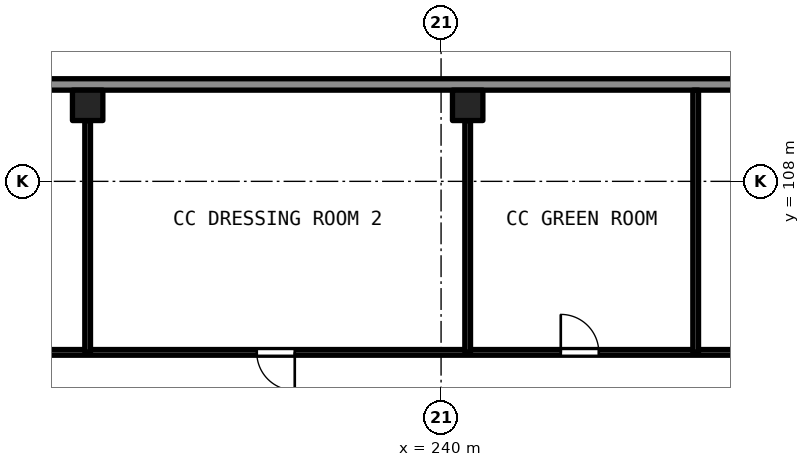
"""IFC4 building model, lengths in metres.
Left out: names, types, materials, properties, quantities, classifications, styles, units other than length and angle.
Written with IfcOpenShell. Run it as: python <this file> out.ifc"""

import sys

from ifc_helpers import new_model, si_unit, direction, frame, frame_2d, origin, origin_2d, place, context, subcontext, project, spatial, rectangle, extrude, element, fill, save


model = new_model("IFC4")
c1 = context("Model", 3, precision=1e-05, world=origin(), true_north=direction((0.0, 1.0)))
c2 = subcontext(c1, "Body", "Model", "MODEL_VIEW")
j1 = project(units=[si_unit("LENGTHUNIT", "METRE"), si_unit("PLANEANGLEUNIT", "RADIAN")], contexts=[c1])
p1 = place(None, origin())
s1 = spatial("IfcSite", under=j1, at=p1, CompositionType="ELEMENT")
p2 = place(p1, origin())
s2 = spatial("IfcBuilding", under=s1, at=p2, CompositionType="ELEMENT")
p3 = place(p2, origin())
s3 = spatial("IfcBuildingStorey", under=s2, at=p3, CompositionType="ELEMENT", Elevation=0.0)
for number, where, z_axis, x_axis in (
    (1, (230.7, 110.0, -1.2), (0.0, 0.0, 1.0), (1.0, 0.0, 0.0)),
    (2, (240.7, 110.0, -1.2), (0.0, 0.0, 1.0), (1.0, 0.0, 0.0)),
):
    element("IfcColumn", number, at=place(p3, frame(where, z_axis=z_axis, x_axis=x_axis)), inside=s3, PredefinedType="COLUMN", context=c2, shape_type="SweptSolid", body=[
        extrude(rectangle(XDim=0.8, YDim=0.8, at=origin_2d()), origin(), (0.0, 0.0, 1.0), 10.2),
    ])
p4 = place(p3, frame((170.7, 110.55, 0.0), z_axis=(0.0, 0.0, 1.0), x_axis=(1.0, 0.0, 0.0)))
e3 = element("IfcWall", 3, at=p4, inside=s3, PredefinedType="SOLIDWALL", context=c2, shape_type="SweptSolid", body=[
    extrude(rectangle(XDim=80.55, YDim=0.3, at=frame_2d((40.275, 0.0))), origin(), (0.0, 0.0, 1.0), 8.59),
])
p5 = place(p4, frame((1.6, 0.0, 0.0)))
e4 = element("IfcOpeningElement", 4, at=p5, cuts=e3, PredefinedType="OPENING", context=c2, shape_type="SweptSolid", body=[
    extrude(rectangle(XDim=4.0, YDim=4.2, at=frame_2d((2.0, 2.1))), frame((0.0, 0.161, 0.0), z_axis=(0.0, -1.0, 0.0), x_axis=(1.0, 0.0, 0.0)), (0.0, 0.0, 1.0), 0.321),
])
p6 = place(p4, frame((11.6, 0.0, 0.0)))
e5 = element("IfcOpeningElement", 5, at=p6, cuts=e3, PredefinedType="OPENING", context=c2, shape_type="SweptSolid", body=[
    extrude(rectangle(XDim=4.0, YDim=4.2, at=frame_2d((2.0, 2.1))), frame((0.0, 0.161, 0.0), z_axis=(0.0, -1.0, 0.0), x_axis=(1.0, 0.0, 0.0)), (0.0, 0.0, 1.0), 0.321),
])
p7 = place(p4, frame((21.6, 0.0, 0.0)))
e6 = element("IfcOpeningElement", 6, at=p7, cuts=e3, PredefinedType="OPENING", context=c2, shape_type="SweptSolid", body=[
    extrude(rectangle(XDim=4.0, YDim=4.2, at=frame_2d((2.0, 2.1))), frame((0.0, 0.161, 0.0), z_axis=(0.0, -1.0, 0.0), x_axis=(1.0, 0.0, 0.0)), (0.0, 0.0, 1.0), 0.321),
])
p8 = place(p4, frame((31.6, 0.0, 0.0)))
e7 = element("IfcOpeningElement", 7, at=p8, cuts=e3, PredefinedType="OPENING", context=c2, shape_type="SweptSolid", body=[
    extrude(rectangle(XDim=4.0, YDim=4.2, at=frame_2d((2.0, 2.1))), frame((0.0, 0.161, 0.0), z_axis=(0.0, -1.0, 0.0), x_axis=(1.0, 0.0, 0.0)), (0.0, 0.0, 1.0), 0.321),
])
p9 = place(p4, frame((16.35, 0.0, 0.0)))
e8 = element("IfcOpeningElement", 8, at=p9, cuts=e3, PredefinedType="OPENING", context=c2, shape_type="SweptSolid", body=[
    extrude(rectangle(XDim=2.4, YDim=2.1, at=frame_2d((1.2, 1.05))), frame((0.0, 0.161, 0.0), z_axis=(0.0, -1.0, 0.0), x_axis=(1.0, 0.0, 0.0)), (0.0, 0.0, 1.0), 0.321),
])
p10 = place(p4, frame((26.35, 0.0, 0.0)))
e9 = element("IfcOpeningElement", 9, at=p10, cuts=e3, PredefinedType="OPENING", context=c2, shape_type="SweptSolid", body=[
    extrude(rectangle(XDim=2.4, YDim=2.1, at=frame_2d((1.2, 1.05))), frame((0.0, 0.161, 0.0), z_axis=(0.0, -1.0, 0.0), x_axis=(1.0, 0.0, 0.0)), (0.0, 0.0, 1.0), 0.321),
])
p11 = place(p4, frame((36.35, 0.0, 0.0)))
e10 = element("IfcOpeningElement", 10, at=p11, cuts=e3, PredefinedType="OPENING", context=c2, shape_type="SweptSolid", body=[
    extrude(rectangle(XDim=2.4, YDim=2.1, at=frame_2d((1.2, 1.05))), frame((0.0, 0.161, 0.0), z_axis=(0.0, -1.0, 0.0), x_axis=(1.0, 0.0, 0.0)), (0.0, 0.0, 1.0), 0.321),
])
p12 = place(p3, frame((251.1, 103.5, 0.0), z_axis=(0.0, 0.0, 1.0), x_axis=(-1.0, 0.0, 0.0)))
e11 = element("IfcWall", 11, at=p12, inside=s3, PredefinedType="PARTITIONING", context=c2, shape_type="SweptSolid", body=[
    extrude(rectangle(XDim=40.4, YDim=0.15, at=frame_2d((20.2, 0.0))), origin(), (0.0, 0.0, 1.0), 8.59),
])
p13 = place(p12, frame((34.95, 0.0, 0.0)))
e12 = element("IfcOpeningElement", 12, at=p13, cuts=e11, PredefinedType="OPENING", context=c2, shape_type="SweptSolid", body=[
    extrude(rectangle(XDim=1.0, YDim=2.1, at=frame_2d((0.5, 1.05))), frame((0.0, 0.085, 0.0), z_axis=(0.0, -1.0, 0.0), x_axis=(1.0, 0.0, 0.0)), (0.0, 0.0, 1.0), 0.171),
])
p14 = place(p12, frame((24.95, 0.0, 0.0)))
e13 = element("IfcOpeningElement", 13, at=p14, cuts=e11, PredefinedType="OPENING", context=c2, shape_type="SweptSolid", body=[
    extrude(rectangle(XDim=1.0, YDim=2.1, at=frame_2d((0.5, 1.05))), frame((0.0, 0.085, 0.0), z_axis=(0.0, -1.0, 0.0), x_axis=(1.0, 0.0, 0.0)), (0.0, 0.0, 1.0), 0.171),
])
p15 = place(p12, frame((14.95, 0.0, 0.0)))
e14 = element("IfcOpeningElement", 14, at=p15, cuts=e11, PredefinedType="OPENING", context=c2, shape_type="SweptSolid", body=[
    extrude(rectangle(XDim=1.0, YDim=2.1, at=frame_2d((0.5, 1.05))), frame((0.0, 0.085, 0.0), z_axis=(0.0, -1.0, 0.0), x_axis=(1.0, 0.0, 0.0)), (0.0, 0.0, 1.0), 0.171),
])
p16 = place(p12, frame((6.95, 0.0, 0.0)))
e15 = element("IfcOpeningElement", 15, at=p16, cuts=e11, PredefinedType="OPENING", context=c2, shape_type="SweptSolid", body=[
    extrude(rectangle(XDim=1.0, YDim=2.1, at=frame_2d((0.5, 1.05))), frame((0.0, 0.085, 0.0), z_axis=(0.0, -1.0, 0.0), x_axis=(1.0, 0.0, 0.0)), (0.0, 0.0, 1.0), 0.171),
])
p17 = place(p12, frame((1.7, 0.0, 0.0)))
e16 = element("IfcOpeningElement", 16, at=p17, cuts=e11, PredefinedType="OPENING", context=c2, shape_type="SweptSolid", body=[
    extrude(rectangle(XDim=1.0, YDim=2.1, at=frame_2d((0.5, 1.05))), frame((0.0, 0.085, 0.0), z_axis=(0.0, -1.0, 0.0), x_axis=(1.0, 0.0, 0.0)), (0.0, 0.0, 1.0), 0.171),
])
for number, where, z_axis, x_axis in (
    (17, (230.7, 103.5, 0.0), (0.0, 0.0, 1.0), (0.0, 1.0, 0.0)),
    (18, (240.7, 103.5, 0.0), (0.0, 0.0, 1.0), (0.0, 1.0, 0.0)),
):
    element("IfcWall", number, at=place(p3, frame(where, z_axis=z_axis, x_axis=x_axis)), inside=s3, PredefinedType="PARTITIONING", context=c2, shape_type="SweptSolid", body=[
        extrude(rectangle(XDim=6.1, YDim=0.15, at=frame_2d((3.05, 0.0))), origin(), (0.0, 0.0, 1.0), 8.59),
    ])
p18 = place(p3, frame((246.7, 103.5, 0.0), z_axis=(0.0, 0.0, 1.0), x_axis=(0.0, 1.0, 0.0)))
e19 = element("IfcWall", 19, at=p18, inside=s3, PredefinedType="PARTITIONING", context=c2, shape_type="SweptSolid", body=[
    extrude(rectangle(XDim=6.9, YDim=0.15, at=frame_2d((3.45, 0.0))), origin(), (0.0, 0.0, 1.0), 8.59),
])
p19 = place(p15, origin())
e20 = element("IfcDoor", 20, at=p19, inside=s3, OperationType="SINGLE_SWING_LEFT", PredefinedType="DOOR", context=c2, shape_type="SweptSolid", body=[
    extrude(rectangle(XDim=1.0, YDim=2.1, at=frame_2d((0.5, 1.05))), frame((0.0, 0.025, 0.0), z_axis=(0.0, -1.0, 0.0), x_axis=(1.0, 0.0, 0.0)), (0.0, 0.0, 1.0), 0.05),
])
fill(e14, e20)
p20 = place(p16, origin())
e21 = element("IfcDoor", 21, at=p20, inside=s3, OperationType="SINGLE_SWING_RIGHT", PredefinedType="DOOR", context=c2, shape_type="SweptSolid", body=[
    extrude(rectangle(XDim=1.0, YDim=2.1, at=frame_2d((0.5, 1.05))), frame((0.0, 0.025, 0.0), z_axis=(0.0, -1.0, 0.0), x_axis=(1.0, 0.0, 0.0)), (0.0, 0.0, 1.0), 0.05),
])
fill(e15, e21)
save(model, sys.argv[1])
